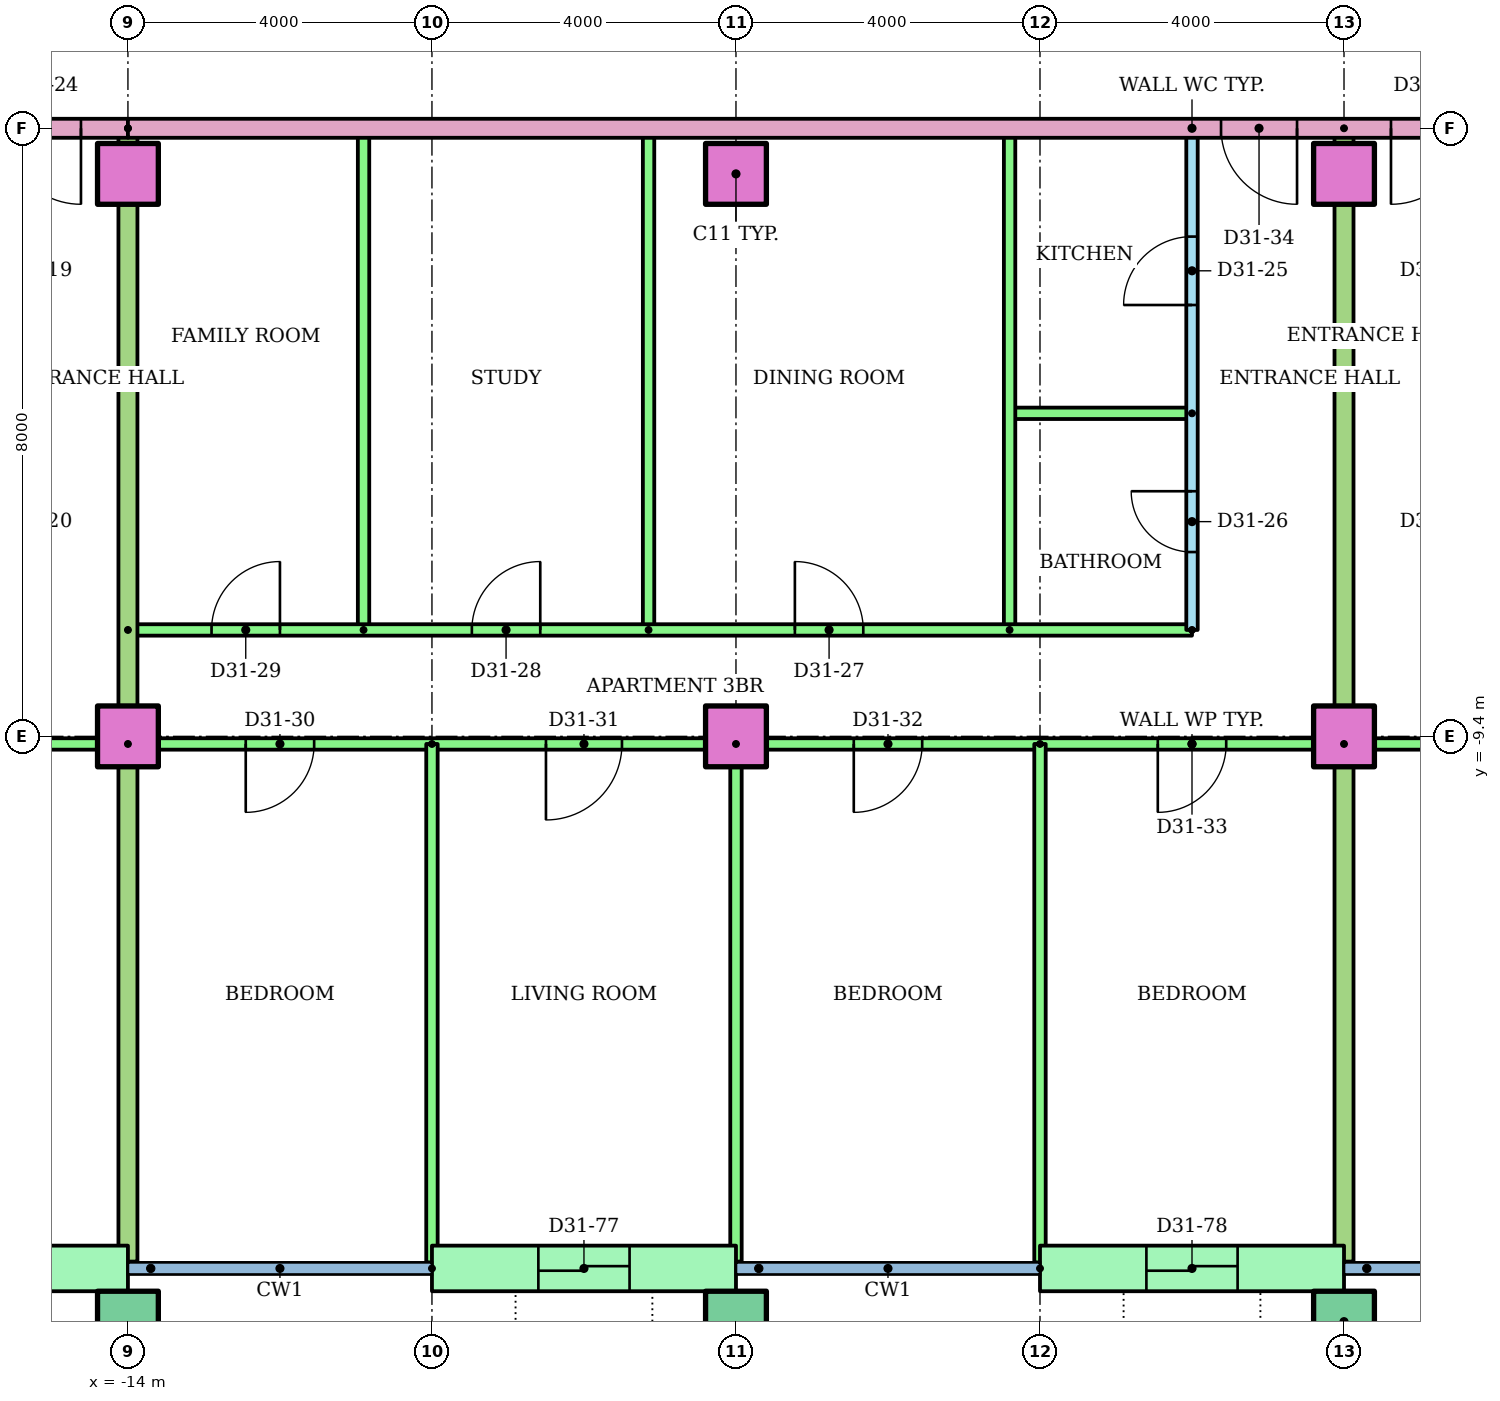
"""IFC4 building model, lengths in metres.
Left out: names, types, materials, properties, quantities, classifications, styles, units other than length and angle.
Written with IfcOpenShell. Run it as: python <this file> out.ifc"""

import sys

from ifc_helpers import new_model, si_unit, direction, frame, frame_2d, origin, origin_2d, place, context, subcontext, project, spatial, rectangle, hollow_rectangle, extrude, element, fill, save


model = new_model("IFC4")
c1 = context("Model", 3, precision=1e-05, world=origin(), true_north=direction((0.0, 1.0)))
c2 = subcontext(c1, "Body", "Model", "MODEL_VIEW")
j1 = project(units=[si_unit("LENGTHUNIT", "METRE"), si_unit("PLANEANGLEUNIT", "RADIAN")], contexts=[c1])
p1 = place(None, origin())
s1 = spatial("IfcSite", under=j1, at=p1, CompositionType="ELEMENT")
p2 = place(p1, origin())
s2 = spatial("IfcBuilding", under=s1, at=p2, CompositionType="ELEMENT")
p3 = place(p2, frame((0.0, 0.0, 123.0)))
s3 = spatial("IfcBuildingStorey", under=s2, at=p3, CompositionType="ELEMENT", Elevation=123.0)
for number, where in (
    (1, (-14.0, -17.1, 0.0)),
    (2, (-6.0, -17.1, 0.0)),
    (3, (2.0, -17.1, 0.0)),
):
    element("IfcColumn", number, at=place(p3, frame(where)), inside=s3, PredefinedType="COLUMN", context=c2, shape_type="SweptSolid", body=[
        extrude(hollow_rectangle(XDim=0.8, YDim=0.8, WallThickness=0.04, at=origin_2d()), origin(), (0.0, 0.0, 1.0), 3.2),
    ])
for number, where in (
    (4, (-14.0, -9.4, 0.0)),
    (5, (-6.0, -9.4, 0.0)),
    (6, (2.0, -9.4, 0.0)),
    (7, (-14.0, -2.0, 0.0)),
    (8, (-6.0, -2.0, 0.0)),
    (9, (2.0, -2.0, 0.0)),
):
    element("IfcColumn", number, at=place(p3, frame(where)), inside=s3, PredefinedType="COLUMN", context=c2, shape_type="SweptSolid", body=[
        extrude(rectangle(XDim=0.8, YDim=0.8, at=origin_2d()), origin(), (0.0, 0.0, 1.0), 3.2),
    ])
p4 = place(p3, frame((-18.0, -16.4, 0.0)))
e10 = element("IfcWall", 10, at=p4, inside=s3, PredefinedType="STANDARD", context=c2, shape_type="SweptSolid", body=[
    extrude(rectangle(XDim=4.0, YDim=0.6, at=frame_2d((2.0, 0.0))), origin(), (0.0, 0.0, 1.0), 2.92),
])
p5 = place(p4, frame((1.4, 0.0, 0.0)))
e11 = element("IfcOpeningElement", 11, at=p5, cuts=e10, PredefinedType="OPENING", context=c2, shape_type="SweptSolid", body=[
    extrude(rectangle(XDim=1.2, YDim=2.1, at=frame_2d((0.6, 1.05))), frame((0.0, 0.31, 0.0), z_axis=(0.0, -1.0, 0.0), x_axis=(1.0, 0.0, 0.0)), (0.0, 0.0, 1.0), 0.62),
])
p6 = place(p3, frame((-10.0, -16.4, 0.0)))
e12 = element("IfcWall", 12, at=p6, inside=s3, PredefinedType="STANDARD", context=c2, shape_type="SweptSolid", body=[
    extrude(rectangle(XDim=4.0, YDim=0.6, at=frame_2d((2.0, 0.0))), origin(), (0.0, 0.0, 1.0), 2.92),
])
p7 = place(p6, frame((1.4, 0.0, 0.0)))
e13 = element("IfcOpeningElement", 13, at=p7, cuts=e12, PredefinedType="OPENING", context=c2, shape_type="SweptSolid", body=[
    extrude(rectangle(XDim=1.2, YDim=2.1, at=frame_2d((0.6, 1.05))), frame((0.0, 0.31, 0.0), z_axis=(0.0, -1.0, 0.0), x_axis=(1.0, 0.0, 0.0)), (0.0, 0.0, 1.0), 0.62),
])
p8 = place(p3, frame((-2.0, -16.4, 0.0)))
e14 = element("IfcWall", 14, at=p8, inside=s3, PredefinedType="STANDARD", context=c2, shape_type="SweptSolid", body=[
    extrude(rectangle(XDim=4.0, YDim=0.6, at=frame_2d((2.0, 0.0))), origin(), (0.0, 0.0, 1.0), 2.92),
])
p9 = place(p8, frame((1.4, 0.0, 0.0)))
e15 = element("IfcOpeningElement", 15, at=p9, cuts=e14, PredefinedType="OPENING", context=c2, shape_type="SweptSolid", body=[
    extrude(rectangle(XDim=1.2, YDim=2.1, at=frame_2d((0.6, 1.05))), frame((0.0, 0.31, 0.0), z_axis=(0.0, -1.0, 0.0), x_axis=(1.0, 0.0, 0.0)), (0.0, 0.0, 1.0), 0.62),
])
p10 = place(p3, frame((-14.0, -9.5, 0.0), z_axis=(0.0, 0.0, 1.0), x_axis=(-1.0, 0.0, 0.0)))
e16 = element("IfcWall", 16, at=p10, inside=s3, PredefinedType="PARTITIONING", context=c2, shape_type="SweptSolid", body=[
    extrude(rectangle(XDim=8.0, YDim=0.15, at=frame_2d((4.0, 0.0))), origin(), (0.0, 0.0, 1.0), 2.4),
])
p11 = place(p10, frame((5.5, 0.0, 0.0)))
e17 = element("IfcOpeningElement", 17, at=p11, cuts=e16, PredefinedType="OPENING", context=c2, shape_type="SweptSolid", body=[
    extrude(rectangle(XDim=1.0, YDim=2.1, at=frame_2d((0.5, 1.05))), frame((0.0, 0.085, 0.0), z_axis=(0.0, -1.0, 0.0), x_axis=(1.0, 0.0, 0.0)), (0.0, 0.0, 1.0), 0.17),
])
p12 = place(p10, frame((1.5, 0.0, 0.0)))
e18 = element("IfcOpeningElement", 18, at=p12, cuts=e16, PredefinedType="OPENING", context=c2, shape_type="SweptSolid", body=[
    extrude(rectangle(XDim=1.0, YDim=2.1, at=frame_2d((0.5, 1.05))), frame((0.0, 0.085, 0.0), z_axis=(0.0, -1.0, 0.0), x_axis=(1.0, 0.0, 0.0)), (0.0, 0.0, 1.0), 0.17),
])
p13 = place(p3, frame((0.0, -8.0, 0.0), z_axis=(0.0, 0.0, 1.0), x_axis=(0.0, 1.0, 0.0)))
e19 = element("IfcWall", 19, at=p13, inside=s3, PredefinedType="PARTITIONING", context=c2, shape_type="SweptSolid", body=[
    extrude(rectangle(XDim=6.6, YDim=0.15, at=frame_2d((3.3, 0.0))), origin(), (0.0, 0.0, 1.0), 2.4),
])
p14 = place(p13, frame((4.275, 0.0, 0.0)))
e20 = element("IfcOpeningElement", 20, at=p14, cuts=e19, PredefinedType="OPENING", context=c2, shape_type="SweptSolid", body=[
    extrude(rectangle(XDim=0.9, YDim=2.1, at=frame_2d((0.45, 1.05))), frame((0.0, 0.085, 0.0), z_axis=(0.0, -1.0, 0.0), x_axis=(1.0, 0.0, 0.0)), (0.0, 0.0, 1.0), 0.17),
])
p15 = place(p13, frame((1.025, 0.0, 0.0)))
e21 = element("IfcOpeningElement", 21, at=p15, cuts=e19, PredefinedType="OPENING", context=c2, shape_type="SweptSolid", body=[
    extrude(rectangle(XDim=0.8, YDim=2.1, at=frame_2d((0.4, 1.05))), frame((0.0, 0.085, 0.0), z_axis=(0.0, -1.0, 0.0), x_axis=(1.0, 0.0, 0.0)), (0.0, 0.0, 1.0), 0.17),
])
p16 = place(p3, frame((0.0, -5.15, 0.0), z_axis=(0.0, 0.0, 1.0), x_axis=(-1.0, 0.0, 0.0)))
e22 = element("IfcWall", 22, at=p16, inside=s3, PredefinedType="PARTITIONING", context=c2, shape_type="SweptSolid", body=[
    extrude(rectangle(XDim=2.4, YDim=0.15, at=frame_2d((1.2, 0.0))), origin(), (0.0, 0.0, 1.0), 2.4),
])
for number, where, z_axis, x_axis in (
    (23, (-2.4, -8.0, 0.0), (0.0, 0.0, 1.0), (0.0, 1.0, 0.0)),
    (24, (-7.15, -8.0, 0.0), (0.0, 0.0, 1.0), (0.0, 1.0, 0.0)),
    (25, (-10.9, -8.0, 0.0), (0.0, 0.0, 1.0), (0.0, 1.0, 0.0)),
):
    element("IfcWall", number, at=place(p3, frame(where, z_axis=z_axis, x_axis=x_axis)), inside=s3, PredefinedType="PARTITIONING", context=c2, shape_type="SweptSolid", body=[
        extrude(rectangle(XDim=6.6, YDim=0.15, at=frame_2d((3.3, 0.0))), origin(), (0.0, 0.0, 1.0), 2.4),
    ])
p17 = place(p3, frame((-14.0, -8.0, 0.0)))
e26 = element("IfcWall", 26, at=p17, inside=s3, PredefinedType="PARTITIONING", context=c2, shape_type="SweptSolid", body=[
    extrude(rectangle(XDim=14.0, YDim=0.15, at=frame_2d((7.0, 0.0))), origin(), (0.0, 0.0, 1.0), 2.4),
])
p18 = place(p17, frame((8.775, 0.0, 0.0)))
e27 = element("IfcOpeningElement", 27, at=p18, cuts=e26, PredefinedType="OPENING", context=c2, shape_type="SweptSolid", body=[
    extrude(rectangle(XDim=0.9, YDim=2.1, at=frame_2d((0.45, 1.05))), frame((0.0, 0.085, 0.0), z_axis=(0.0, -1.0, 0.0), x_axis=(1.0, 0.0, 0.0)), (0.0, 0.0, 1.0), 0.17),
])
p19 = place(p17, frame((4.525, 0.0, 0.0)))
e28 = element("IfcOpeningElement", 28, at=p19, cuts=e26, PredefinedType="OPENING", context=c2, shape_type="SweptSolid", body=[
    extrude(rectangle(XDim=0.9, YDim=2.1, at=frame_2d((0.45, 1.05))), frame((0.0, 0.085, 0.0), z_axis=(0.0, -1.0, 0.0), x_axis=(1.0, 0.0, 0.0)), (0.0, 0.0, 1.0), 0.17),
])
p20 = place(p17, frame((1.1, 0.0, 0.0)))
e29 = element("IfcOpeningElement", 29, at=p20, cuts=e26, PredefinedType="OPENING", context=c2, shape_type="SweptSolid", body=[
    extrude(rectangle(XDim=0.9, YDim=2.1, at=frame_2d((0.45, 1.05))), frame((0.0, 0.085, 0.0), z_axis=(0.0, -1.0, 0.0), x_axis=(1.0, 0.0, 0.0)), (0.0, 0.0, 1.0), 0.17),
])
p21 = place(p3, frame((2.0, -9.5, 0.0), z_axis=(0.0, 0.0, 1.0), x_axis=(-1.0, 0.0, 0.0)))
e30 = element("IfcWall", 30, at=p21, inside=s3, PredefinedType="PARTITIONING", context=c2, shape_type="SweptSolid", body=[
    extrude(rectangle(XDim=16.0, YDim=0.15, at=frame_2d((8.0, 0.0))), origin(), (0.0, 0.0, 1.0), 2.4),
])
p22 = place(p21, frame((13.55, 0.0, 0.0)))
e31 = element("IfcOpeningElement", 31, at=p22, cuts=e30, PredefinedType="OPENING", context=c2, shape_type="SweptSolid", body=[
    extrude(rectangle(XDim=0.9, YDim=2.1, at=frame_2d((0.45, 1.05))), frame((0.0, 0.085, 0.0), z_axis=(0.0, -1.0, 0.0), x_axis=(1.0, 0.0, 0.0)), (0.0, 0.0, 1.0), 0.17),
])
p23 = place(p21, frame((9.5, 0.0, 0.0)))
e32 = element("IfcOpeningElement", 32, at=p23, cuts=e30, PredefinedType="OPENING", context=c2, shape_type="SweptSolid", body=[
    extrude(rectangle(XDim=1.0, YDim=2.1, at=frame_2d((0.5, 1.05))), frame((0.0, 0.085, 0.0), z_axis=(0.0, -1.0, 0.0), x_axis=(1.0, 0.0, 0.0)), (0.0, 0.0, 1.0), 0.17),
])
p24 = place(p21, frame((5.55, 0.0, 0.0)))
e33 = element("IfcOpeningElement", 33, at=p24, cuts=e30, PredefinedType="OPENING", context=c2, shape_type="SweptSolid", body=[
    extrude(rectangle(XDim=0.9, YDim=2.1, at=frame_2d((0.45, 1.05))), frame((0.0, 0.085, 0.0), z_axis=(0.0, -1.0, 0.0), x_axis=(1.0, 0.0, 0.0)), (0.0, 0.0, 1.0), 0.17),
])
p25 = place(p21, frame((1.55, 0.0, 0.0)))
e34 = element("IfcOpeningElement", 34, at=p25, cuts=e30, PredefinedType="OPENING", context=c2, shape_type="SweptSolid", body=[
    extrude(rectangle(XDim=0.9, YDim=2.1, at=frame_2d((0.45, 1.05))), frame((0.0, 0.085, 0.0), z_axis=(0.0, -1.0, 0.0), x_axis=(1.0, 0.0, 0.0)), (0.0, 0.0, 1.0), 0.17),
])
p26 = place(p3, frame((-10.0, -9.5, 0.0), z_axis=(0.0, 0.0, 1.0), x_axis=(0.0, -1.0, 0.0)))
e35 = element("IfcWall", 35, at=p26, inside=s3, PredefinedType="PARTITIONING", context=c2, shape_type="SweptSolid", body=[
    extrude(rectangle(XDim=6.821, YDim=0.15, at=frame_2d((3.411, 0.0))), origin(), (0.0, 0.0, 1.0), 2.4),
])
p27 = place(p3, frame((-6.0, -9.5, 0.0), z_axis=(0.0, 0.0, 1.0), x_axis=(0.0, -1.0, 0.0)))
e36 = element("IfcWall", 36, at=p27, inside=s3, PredefinedType="PARTITIONING", context=c2, shape_type="SweptSolid", body=[
    extrude(rectangle(XDim=6.81, YDim=0.15, at=frame_2d((3.405, 0.0))), origin(), (0.0, 0.0, 1.0), 2.4),
])
p28 = place(p3, frame((-2.0, -9.5, 0.0), z_axis=(0.0, 0.0, 1.0), x_axis=(0.0, -1.0, 0.0)))
e37 = element("IfcWall", 37, at=p28, inside=s3, PredefinedType="PARTITIONING", context=c2, shape_type="SweptSolid", body=[
    extrude(rectangle(XDim=6.821, YDim=0.15, at=frame_2d((3.411, 0.0))), origin(), (0.0, 0.0, 1.0), 2.4),
])
p29 = place(p3, frame((-14.0, -1.4, 0.0), z_axis=(0.0, 0.0, 1.0), x_axis=(0.0, -1.0, 0.0)))
e38 = element("IfcWall", 38, at=p29, inside=s3, PredefinedType="PARTITIONING", context=c2, shape_type="SweptSolid", body=[
    extrude(rectangle(XDim=14.91, YDim=0.25, at=frame_2d((7.455, 0.0))), origin(), (0.0, 0.0, 1.0), 2.4),
])
p30 = place(p3, frame((18.0, -9.5, 0.0), z_axis=(0.0, 0.0, 1.0), x_axis=(-1.0, 0.0, 0.0)))
e39 = element("IfcWall", 39, at=p30, inside=s3, PredefinedType="PARTITIONING", context=c2, shape_type="SweptSolid", body=[
    extrude(rectangle(XDim=16.0, YDim=0.15, at=frame_2d((8.0, 0.0))), origin(), (0.0, 0.0, 1.0), 2.4),
])
p31 = place(p30, frame((13.55, 0.0, 0.0)))
e40 = element("IfcOpeningElement", 40, at=p31, cuts=e39, PredefinedType="OPENING", context=c2, shape_type="SweptSolid", body=[
    extrude(rectangle(XDim=0.9, YDim=2.1, at=frame_2d((0.45, 1.05))), frame((0.0, 0.085, 0.0), z_axis=(0.0, -1.0, 0.0), x_axis=(1.0, 0.0, 0.0)), (0.0, 0.0, 1.0), 0.17),
])
p32 = place(p30, frame((9.55, 0.0, 0.0)))
e41 = element("IfcOpeningElement", 41, at=p32, cuts=e39, PredefinedType="OPENING", context=c2, shape_type="SweptSolid", body=[
    extrude(rectangle(XDim=0.9, YDim=2.1, at=frame_2d((0.45, 1.05))), frame((0.0, 0.085, 0.0), z_axis=(0.0, -1.0, 0.0), x_axis=(1.0, 0.0, 0.0)), (0.0, 0.0, 1.0), 0.17),
])
p33 = place(p30, frame((3.5, 0.0, 0.0)))
e42 = element("IfcOpeningElement", 42, at=p33, cuts=e39, PredefinedType="OPENING", context=c2, shape_type="SweptSolid", body=[
    extrude(rectangle(XDim=1.0, YDim=2.1, at=frame_2d((0.5, 1.05))), frame((0.0, 0.085, 0.0), z_axis=(0.0, -1.0, 0.0), x_axis=(1.0, 0.0, 0.0)), (0.0, 0.0, 1.0), 0.17),
])
p34 = place(p3, frame((2.0, -1.4, 0.0), z_axis=(0.0, 0.0, 1.0), x_axis=(0.0, -1.0, 0.0)))
e43 = element("IfcWall", 43, at=p34, inside=s3, PredefinedType="PARTITIONING", context=c2, shape_type="SweptSolid", body=[
    extrude(rectangle(XDim=14.91, YDim=0.25, at=frame_2d((7.455, 0.0))), origin(), (0.0, 0.0, 1.0), 2.4),
])
p35 = place(p3, frame((-14.0, -1.4, 0.0), z_axis=(0.0, 0.0, 1.0), x_axis=(-1.0, 0.0, 0.0)))
e44 = element("IfcWall", 44, at=p35, inside=s3, PredefinedType="PARTITIONING", context=c2, shape_type="SweptSolid", body=[
    extrude(rectangle(XDim=15.0, YDim=0.25, at=frame_2d((7.5, 0.0))), origin(), (0.0, 0.0, 1.0), 2.4),
])
p36 = place(p35, frame((8.618, 0.0, 0.0)))
e45 = element("IfcOpeningElement", 45, at=p36, cuts=e44, PredefinedType="OPENING", context=c2, shape_type="SweptSolid", body=[
    extrude(rectangle(XDim=1.0, YDim=2.1, at=frame_2d((0.5, 1.05))), frame((0.0, 0.135, 0.0), z_axis=(0.0, -1.0, 0.0), x_axis=(1.0, 0.0, 0.0)), (0.0, 0.0, 1.0), 0.27),
])
p37 = place(p35, frame((0.618, 0.0, 0.0)))
e46 = element("IfcOpeningElement", 46, at=p37, cuts=e44, PredefinedType="OPENING", context=c2, shape_type="SweptSolid", body=[
    extrude(rectangle(XDim=1.0, YDim=2.1, at=frame_2d((0.5, 1.05))), frame((0.0, 0.135, 0.0), z_axis=(0.0, -1.0, 0.0), x_axis=(1.0, 0.0, 0.0)), (0.0, 0.0, 1.0), 0.27),
])
p38 = place(p3, frame((14.0, -1.4, 0.0), z_axis=(0.0, 0.0, 1.0), x_axis=(-1.0, 0.0, 0.0)))
e47 = element("IfcWall", 47, at=p38, inside=s3, PredefinedType="PARTITIONING", context=c2, shape_type="SweptSolid", body=[
    extrude(rectangle(XDim=28.0, YDim=0.25, at=frame_2d((14.0, 0.0))), origin(), (0.0, 0.0, 1.0), 2.4),
])
p39 = place(p38, frame((12.618, 0.0, 0.0)))
e48 = element("IfcOpeningElement", 48, at=p39, cuts=e47, PredefinedType="OPENING", context=c2, shape_type="SweptSolid", body=[
    extrude(rectangle(XDim=1.0, YDim=2.1, at=frame_2d((0.5, 1.05))), frame((0.0, 0.135, 0.0), z_axis=(0.0, -1.0, 0.0), x_axis=(1.0, 0.0, 0.0)), (0.0, 0.0, 1.0), 0.27),
])
p40 = place(p38, frame((10.382, 0.0, 0.0)))
e49 = element("IfcOpeningElement", 49, at=p40, cuts=e47, PredefinedType="OPENING", context=c2, shape_type="SweptSolid", body=[
    extrude(rectangle(XDim=1.0, YDim=2.1, at=frame_2d((0.5, 1.05))), frame((0.0, 0.135, 0.0), z_axis=(0.0, -1.0, 0.0), x_axis=(1.0, 0.0, 0.0)), (0.0, 0.0, 1.0), 0.27),
])
p41 = place(p37, origin())
e50 = element("IfcDoor", 50, at=p41, inside=s3, OperationType="SINGLE_SWING_LEFT", PredefinedType="DOOR", context=c2, shape_type="SweptSolid", body=[
    extrude(rectangle(XDim=1.0, YDim=2.1, at=frame_2d((0.5, 1.05))), frame((0.0, 0.025, 0.0), z_axis=(0.0, -1.0, 0.0), x_axis=(1.0, 0.0, 0.0)), (0.0, 0.0, 1.0), 0.05),
])
fill(e46, e50)
p42 = place(p14, origin())
e51 = element("IfcDoor", 51, at=p42, inside=s3, OperationType="SINGLE_SWING_LEFT", PredefinedType="DOOR", context=c2, shape_type="SweptSolid", body=[
    extrude(rectangle(XDim=0.9, YDim=2.1, at=frame_2d((0.45, 1.05))), frame((0.0, 0.025, 0.0), z_axis=(0.0, -1.0, 0.0), x_axis=(1.0, 0.0, 0.0)), (0.0, 0.0, 1.0), 0.05),
])
fill(e20, e51)
p43 = place(p15, origin())
e52 = element("IfcDoor", 52, at=p43, inside=s3, OperationType="SINGLE_SWING_RIGHT", PredefinedType="DOOR", context=c2, shape_type="SweptSolid", body=[
    extrude(rectangle(XDim=0.8, YDim=2.1, at=frame_2d((0.4, 1.05))), frame((0.0, 0.025, 0.0), z_axis=(0.0, -1.0, 0.0), x_axis=(1.0, 0.0, 0.0)), (0.0, 0.0, 1.0), 0.05),
])
fill(e21, e52)
p44 = place(p18, origin())
e53 = element("IfcDoor", 53, at=p44, inside=s3, OperationType="SINGLE_SWING_LEFT", PredefinedType="DOOR", context=c2, shape_type="SweptSolid", body=[
    extrude(rectangle(XDim=0.9, YDim=2.1, at=frame_2d((0.45, 1.05))), frame((0.0, 0.025, 0.0), z_axis=(0.0, -1.0, 0.0), x_axis=(1.0, 0.0, 0.0)), (0.0, 0.0, 1.0), 0.05),
])
fill(e27, e53)
p45 = place(p19, origin())
e54 = element("IfcDoor", 54, at=p45, inside=s3, OperationType="SINGLE_SWING_RIGHT", PredefinedType="DOOR", context=c2, shape_type="SweptSolid", body=[
    extrude(rectangle(XDim=0.9, YDim=2.1, at=frame_2d((0.45, 1.05))), frame((0.0, 0.025, 0.0), z_axis=(0.0, -1.0, 0.0), x_axis=(1.0, 0.0, 0.0)), (0.0, 0.0, 1.0), 0.05),
])
fill(e28, e54)
p46 = place(p20, origin())
e55 = element("IfcDoor", 55, at=p46, inside=s3, OperationType="SINGLE_SWING_RIGHT", PredefinedType="DOOR", context=c2, shape_type="SweptSolid", body=[
    extrude(rectangle(XDim=0.9, YDim=2.1, at=frame_2d((0.45, 1.05))), frame((0.0, 0.025, 0.0), z_axis=(0.0, -1.0, 0.0), x_axis=(1.0, 0.0, 0.0)), (0.0, 0.0, 1.0), 0.05),
])
fill(e29, e55)
p47 = place(p22, origin())
e56 = element("IfcDoor", 56, at=p47, inside=s3, OperationType="SINGLE_SWING_RIGHT", PredefinedType="DOOR", context=c2, shape_type="SweptSolid", body=[
    extrude(rectangle(XDim=0.9, YDim=2.1, at=frame_2d((0.45, 1.05))), frame((0.0, 0.025, 0.0), z_axis=(0.0, -1.0, 0.0), x_axis=(1.0, 0.0, 0.0)), (0.0, 0.0, 1.0), 0.05),
])
fill(e31, e56)
p48 = place(p23, origin())
e57 = element("IfcDoor", 57, at=p48, inside=s3, OperationType="SINGLE_SWING_RIGHT", PredefinedType="DOOR", context=c2, shape_type="SweptSolid", body=[
    extrude(rectangle(XDim=1.0, YDim=2.1, at=frame_2d((0.5, 1.05))), frame((0.0, 0.025, 0.0), z_axis=(0.0, -1.0, 0.0), x_axis=(1.0, 0.0, 0.0)), (0.0, 0.0, 1.0), 0.05),
])
fill(e32, e57)
p49 = place(p24, origin())
e58 = element("IfcDoor", 58, at=p49, inside=s3, OperationType="SINGLE_SWING_RIGHT", PredefinedType="DOOR", context=c2, shape_type="SweptSolid", body=[
    extrude(rectangle(XDim=0.9, YDim=2.1, at=frame_2d((0.45, 1.05))), frame((0.0, 0.025, 0.0), z_axis=(0.0, -1.0, 0.0), x_axis=(1.0, 0.0, 0.0)), (0.0, 0.0, 1.0), 0.05),
])
fill(e33, e58)
p50 = place(p25, origin())
e59 = element("IfcDoor", 59, at=p50, inside=s3, OperationType="SINGLE_SWING_RIGHT", PredefinedType="DOOR", context=c2, shape_type="SweptSolid", body=[
    extrude(rectangle(XDim=0.9, YDim=2.1, at=frame_2d((0.45, 1.05))), frame((0.0, 0.025, 0.0), z_axis=(0.0, -1.0, 0.0), x_axis=(1.0, 0.0, 0.0)), (0.0, 0.0, 1.0), 0.05),
])
fill(e34, e59)
p51 = place(p39, origin())
e60 = element("IfcDoor", 60, at=p51, inside=s3, OperationType="SINGLE_SWING_LEFT", PredefinedType="DOOR", context=c2, shape_type="SweptSolid", body=[
    extrude(rectangle(XDim=1.0, YDim=2.1, at=frame_2d((0.5, 1.05))), frame((0.0, 0.025, 0.0), z_axis=(0.0, -1.0, 0.0), x_axis=(1.0, 0.0, 0.0)), (0.0, 0.0, 1.0), 0.05),
])
fill(e48, e60)
p52 = place(p40, origin())
e61 = element("IfcDoor", 61, at=p52, inside=s3, OperationType="SINGLE_SWING_RIGHT", PredefinedType="DOOR", context=c2, shape_type="SweptSolid", body=[
    extrude(rectangle(XDim=1.0, YDim=2.1, at=frame_2d((0.5, 1.05))), frame((0.0, 0.025, 0.0), z_axis=(0.0, -1.0, 0.0), x_axis=(1.0, 0.0, 0.0)), (0.0, 0.0, 1.0), 0.05),
])
fill(e49, e61)
p53 = place(p7, origin())
e62 = element("IfcDoor", 62, at=p53, inside=s3, OperationType="SLIDING_TO_LEFT", PredefinedType="DOOR", context=c2, shape_type="SweptSolid", body=[
    extrude(rectangle(XDim=1.2, YDim=2.1, at=frame_2d((0.6, 1.05))), frame((0.0, 0.025, 0.0), z_axis=(0.0, -1.0, 0.0), x_axis=(1.0, 0.0, 0.0)), (0.0, 0.0, 1.0), 0.05),
])
fill(e13, e62)
p54 = place(p9, origin())
e63 = element("IfcDoor", 63, at=p54, inside=s3, OperationType="SLIDING_TO_LEFT", PredefinedType="DOOR", context=c2, shape_type="SweptSolid", body=[
    extrude(rectangle(XDim=1.2, YDim=2.1, at=frame_2d((0.6, 1.05))), frame((0.0, 0.025, 0.0), z_axis=(0.0, -1.0, 0.0), x_axis=(1.0, 0.0, 0.0)), (0.0, 0.0, 1.0), 0.05),
])
fill(e15, e63)
save(model, sys.argv[1])
